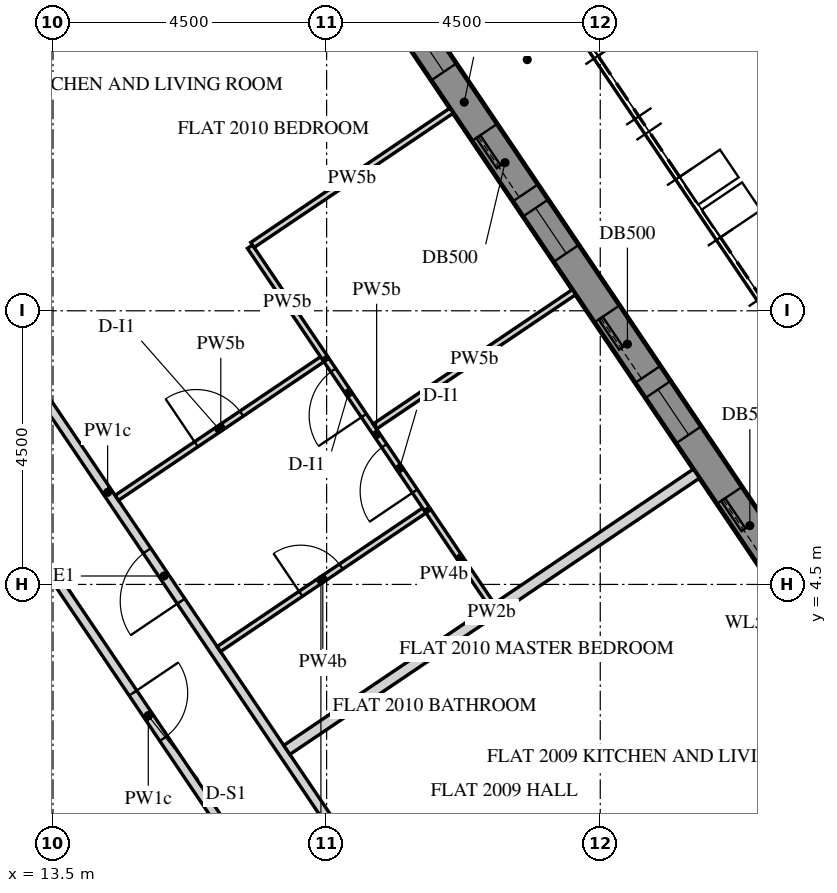
"""IFC4 building model, lengths in metres.
Left out: names, types, materials, properties, quantities, classifications, styles, units other than length and angle.
Written with IfcOpenShell. Run it as: python <this file> out.ifc"""

import sys

from ifc_helpers import new_model, si_unit, direction, frame, frame_2d, origin, place, context, subcontext, project, spatial, polyline, rectangle, outline, extrude, element, fill, save


model = new_model("IFC4")
c1 = context("Model", 3, precision=1e-05, world=origin(), true_north=direction((0.0, 1.0)))
c2 = subcontext(c1, "Body", "Model", "MODEL_VIEW")
j1 = project(units=[si_unit("LENGTHUNIT", "METRE"), si_unit("PLANEANGLEUNIT", "RADIAN")], contexts=[c1])
p1 = place(None, origin())
s1 = spatial("IfcSite", under=j1, at=p1, CompositionType="ELEMENT")
p2 = place(p1, origin())
s2 = spatial("IfcBuilding", under=s1, at=p2, CompositionType="ELEMENT")
p3 = place(p2, frame((0.0, 0.0, 256.2)))
s3 = spatial("IfcBuildingStorey", under=s2, at=p3, CompositionType="ELEMENT", Elevation=256.2)
p4 = place(p3, frame((26.706, 2.879, 0.0), z_axis=(0.0, 0.0, 1.0), x_axis=(-0.559197891507, 0.829034208061, 0.0)))
e1 = element("IfcWall", 1, at=p4, inside=s3, PredefinedType="SOLIDWALL", context=c2, shape_type="SweptSolid", body=[
    extrude(outline(polyline([(0.25, -0.25), (22.795, -0.25), (23.295, 0.25), (-0.25, 0.25), (0.25, -0.25)])), origin(), (0.0, 0.0, 1.0), 3.75),
])
p5 = place(p4, frame((1.323, 0.0, 0.9)))
e2 = element("IfcOpeningElement", 2, at=p5, cuts=e1, PredefinedType="OPENING", context=c2, shape_type="SweptSolid", body=[
    extrude(rectangle(XDim=0.9, YDim=1.5, at=frame_2d((0.45, 0.75))), frame((0.0, 0.26, 0.0), z_axis=(0.0, -1.0, 0.0), x_axis=(1.0, 0.0, 0.0)), (0.0, 0.0, 1.0), 0.52),
])
p6 = place(p4, frame((2.522, 0.0, 0.0)))
e3 = element("IfcOpeningElement", 3, at=p6, cuts=e1, PredefinedType="OPENING", context=c2, shape_type="SweptSolid", body=[
    extrude(rectangle(XDim=1.2, YDim=2.4, at=frame_2d((0.6, 1.2))), frame((0.0, 0.26, 0.0), z_axis=(0.0, -1.0, 0.0), x_axis=(1.0, 0.0, 0.0)), (0.0, 0.0, 1.0), 0.52),
])
p7 = place(p4, frame((4.922, 0.0, 0.9)))
e4 = element("IfcOpeningElement", 4, at=p7, cuts=e1, PredefinedType="OPENING", context=c2, shape_type="SweptSolid", body=[
    extrude(rectangle(XDim=0.9, YDim=1.5, at=frame_2d((0.45, 0.75))), frame((0.0, 0.26, 0.0), z_axis=(0.0, -1.0, 0.0), x_axis=(1.0, 0.0, 0.0)), (0.0, 0.0, 1.0), 0.52),
])
p8 = place(p4, frame((6.122, 0.0, 0.0)))
e5 = element("IfcOpeningElement", 5, at=p8, cuts=e1, PredefinedType="OPENING", context=c2, shape_type="SweptSolid", body=[
    extrude(rectangle(XDim=1.2, YDim=2.4, at=frame_2d((0.6, 1.2))), frame((0.0, 0.26, 0.0), z_axis=(0.0, -1.0, 0.0), x_axis=(1.0, 0.0, 0.0)), (0.0, 0.0, 1.0), 0.52),
])
p9 = place(p4, frame((8.522, 0.0, 0.9)))
e6 = element("IfcOpeningElement", 6, at=p9, cuts=e1, PredefinedType="OPENING", context=c2, shape_type="SweptSolid", body=[
    extrude(rectangle(XDim=0.9, YDim=1.5, at=frame_2d((0.45, 0.75))), frame((0.0, 0.26, 0.0), z_axis=(0.0, -1.0, 0.0), x_axis=(1.0, 0.0, 0.0)), (0.0, 0.0, 1.0), 0.52),
])
p10 = place(p4, frame((9.722, 0.0, 0.0)))
e7 = element("IfcOpeningElement", 7, at=p10, cuts=e1, PredefinedType="OPENING", context=c2, shape_type="SweptSolid", body=[
    extrude(rectangle(XDim=1.2, YDim=2.4, at=frame_2d((0.6, 1.2))), frame((0.0, 0.26, 0.0), z_axis=(0.0, -1.0, 0.0), x_axis=(1.0, 0.0, 0.0)), (0.0, 0.0, 1.0), 0.52),
])
p11 = place(p4, frame((12.122, 0.0, 0.9)))
e8 = element("IfcOpeningElement", 8, at=p11, cuts=e1, PredefinedType="OPENING", context=c2, shape_type="SweptSolid", body=[
    extrude(rectangle(XDim=0.9, YDim=1.5, at=frame_2d((0.45, 0.75))), frame((0.0, 0.26, 0.0), z_axis=(0.0, -1.0, 0.0), x_axis=(1.0, 0.0, 0.0)), (0.0, 0.0, 1.0), 0.52),
])
p12 = place(p4, frame((13.323, 0.0, 0.0)))
e9 = element("IfcOpeningElement", 9, at=p12, cuts=e1, PredefinedType="OPENING", context=c2, shape_type="SweptSolid", body=[
    extrude(rectangle(XDim=1.2, YDim=2.4, at=frame_2d((0.6, 1.2))), frame((0.0, 0.26, 0.0), z_axis=(0.0, -1.0, 0.0), x_axis=(1.0, 0.0, 0.0)), (0.0, 0.0, 1.0), 0.52),
])
p13 = place(p4, frame((15.722, 0.0, 0.9)))
e10 = element("IfcOpeningElement", 10, at=p13, cuts=e1, PredefinedType="OPENING", context=c2, shape_type="SweptSolid", body=[
    extrude(rectangle(XDim=0.9, YDim=1.5, at=frame_2d((0.45, 0.75))), frame((0.0, 0.26, 0.0), z_axis=(0.0, -1.0, 0.0), x_axis=(1.0, 0.0, 0.0)), (0.0, 0.0, 1.0), 0.52),
])
p14 = place(p4, frame((16.922, 0.0, 0.0)))
e11 = element("IfcOpeningElement", 11, at=p14, cuts=e1, PredefinedType="OPENING", context=c2, shape_type="SweptSolid", body=[
    extrude(rectangle(XDim=1.2, YDim=2.4, at=frame_2d((0.6, 1.2))), frame((0.0, 0.26, 0.0), z_axis=(0.0, -1.0, 0.0), x_axis=(1.0, 0.0, 0.0)), (0.0, 0.0, 1.0), 0.52),
])
p15 = place(p4, frame((19.323, 0.0, 0.9)))
e12 = element("IfcOpeningElement", 12, at=p15, cuts=e1, PredefinedType="OPENING", context=c2, shape_type="SweptSolid", body=[
    extrude(rectangle(XDim=0.9, YDim=1.5, at=frame_2d((0.45, 0.75))), frame((0.0, 0.26, 0.0), z_axis=(0.0, -1.0, 0.0), x_axis=(1.0, 0.0, 0.0)), (0.0, 0.0, 1.0), 0.52),
])
p16 = place(p4, frame((20.522, 0.0, 0.0)))
e13 = element("IfcOpeningElement", 13, at=p16, cuts=e1, PredefinedType="OPENING", context=c2, shape_type="SweptSolid", body=[
    extrude(rectangle(XDim=1.2, YDim=2.4, at=frame_2d((0.6, 1.2))), frame((0.0, 0.26, 0.0), z_axis=(0.0, -1.0, 0.0), x_axis=(1.0, 0.0, 0.0)), (0.0, 0.0, 1.0), 0.52),
])
p17 = place(p3, frame((6.351, 11.0, 0.0), z_axis=(0.0, 0.0, 1.0), x_axis=(0.499998894578, 0.866026041999, 0.0)))
e14 = element("IfcWall", 14, at=p17, inside=s3, PredefinedType="SHEAR", context=c2, shape_type="SweptSolid", body=[
    extrude(rectangle(XDim=15.544, YDim=0.4, at=frame_2d((7.772, 0.0))), origin(), (0.0, 0.0, 1.0), 3.75),
])
p18 = place(p17, frame((6.872, 0.0, 0.0)))
e15 = element("IfcOpeningElement", 15, at=p18, cuts=e14, PredefinedType="OPENING", context=c2, shape_type="SweptSolid", body=[
    extrude(rectangle(XDim=1.8, YDim=2.4, at=frame_2d((0.9, 1.2))), frame((0.0, 0.21, 0.0), z_axis=(0.0, -1.0, 0.0), x_axis=(1.0, 0.0, 0.0)), (0.0, 0.0, 1.0), 0.42),
])
p19 = place(p3, frame((19.228, -1.146, 0.0), z_axis=(0.0, 0.0, 1.0), x_axis=(-0.559190017735, 0.829039519001, 0.0)))
e16 = element("IfcWall", 16, at=p19, inside=s3, PredefinedType="PARTITIONING", context=c2, shape_type="SweptSolid", body=[
    extrude(rectangle(XDim=17.273, YDim=0.15, at=frame_2d((8.637, 0.0))), origin(), (0.0, 0.0, 1.0), 2.823),
])
p20 = place(p19, frame((6.478, 0.0, 0.0)))
e17 = element("IfcOpeningElement", 17, at=p20, cuts=e16, PredefinedType="OPENING", context=c2, shape_type="SweptSolid", body=[
    extrude(rectangle(XDim=1.0, YDim=2.1, at=frame_2d((0.5, 1.05))), frame((0.0, 0.085, 0.0), z_axis=(0.0, -1.0, 0.0), x_axis=(1.0, 0.0, 0.0)), (0.0, 0.0, 1.0), 0.17),
])
p21 = place(p3, frame((12.627, 5.958, 0.0), z_axis=(0.0, 0.0, 1.0), x_axis=(0.559185493191, -0.829042570804, 0.0)))
e18 = element("IfcWall", 18, at=p21, inside=s3, PredefinedType="PARTITIONING", context=c2, shape_type="SweptSolid", body=[
    extrude(rectangle(XDim=8.727, YDim=0.15, at=frame_2d((4.363, 0.0))), origin(), (0.0, 0.0, 1.0), 2.823),
])
p22 = place(p21, frame((3.913, 0.0, 0.0)))
e19 = element("IfcOpeningElement", 19, at=p22, cuts=e18, PredefinedType="OPENING", context=c2, shape_type="SweptSolid", body=[
    extrude(rectangle(XDim=0.9, YDim=2.1, at=frame_2d((0.45, 1.05))), frame((0.0, 0.085, 0.0), z_axis=(0.0, -1.0, 0.0), x_axis=(1.0, 0.0, 0.0)), (0.0, 0.0, 1.0), 0.17),
])
p23 = place(p3, frame((24.082, 6.323, 0.0), z_axis=(0.0, 0.0, 1.0), x_axis=(-0.829033253898, -0.55919930609, 0.0)))
e20 = element("IfcWall", 20, at=p23, inside=s3, PredefinedType="PARTITIONING", context=c2, shape_type="SweptSolid", body=[
    extrude(rectangle(XDim=8.125, YDim=0.18, at=frame_2d((4.062, 0.0))), origin(), (0.0, 0.0, 1.0), 2.823),
])
p24 = place(p3, frame((14.55, 5.924, 0.0), z_axis=(0.0, 0.0, 1.0), x_axis=(0.829005765264, 0.559240056827, 0.0)))
e21 = element("IfcWall", 21, at=p24, inside=s3, PredefinedType="PARTITIONING", context=c2, shape_type="SweptSolid", body=[
    extrude(rectangle(XDim=4.125, YDim=0.1, at=frame_2d((2.062, 0.0))), origin(), (0.0, 0.0, 1.0), 2.823),
])
p25 = place(p24, frame((1.575, 0.0, 0.0)))
e22 = element("IfcOpeningElement", 22, at=p25, cuts=e21, PredefinedType="OPENING", context=c2, shape_type="SweptSolid", body=[
    extrude(rectangle(XDim=0.9, YDim=2.1, at=frame_2d((0.45, 1.05))), frame((0.0, 0.06, 0.0), z_axis=(0.0, -1.0, 0.0), x_axis=(1.0, 0.0, 0.0)), (0.0, 0.0, 1.0), 0.12),
])
p26 = place(p3, frame((17.971, 8.229, 0.0), z_axis=(0.0, 0.0, 1.0), x_axis=(-0.559246231198, 0.829001600053, 0.0)))
e23 = element("IfcWall", 23, at=p26, inside=s3, PredefinedType="PARTITIONING", context=c2, shape_type="SweptSolid", body=[
    extrude(rectangle(XDim=2.202, YDim=0.1, at=frame_2d((1.101, 0.0))), origin(), (0.0, 0.0, 1.0), 2.823),
])
p27 = place(p3, frame((16.781, 10.083, 0.0), z_axis=(0.0, 0.0, 1.0), x_axis=(0.829042808667, 0.559185140536, 0.0)))
e24 = element("IfcWall", 24, at=p27, inside=s3, PredefinedType="PARTITIONING", context=c2, shape_type="SweptSolid", body=[
    extrude(rectangle(XDim=3.95, YDim=0.1, at=frame_2d((1.975, 0.0))), origin(), (0.0, 0.0, 1.0), 2.823),
])
p28 = place(p3, frame((16.227, 3.437, 0.0), z_axis=(0.0, 0.0, 1.0), x_axis=(0.829033204172, 0.559199379811, 0.0)))
e25 = element("IfcWall", 25, at=p28, inside=s3, PredefinedType="PARTITIONING", context=c2, shape_type="SweptSolid", body=[
    extrude(rectangle(XDim=4.125, YDim=0.1, at=frame_2d((2.062, 0.0))), origin(), (0.0, 0.0, 1.0), 2.823),
])
p29 = place(p28, frame((1.625, 0.0, 0.0)))
e26 = element("IfcOpeningElement", 26, at=p29, cuts=e25, PredefinedType="OPENING", context=c2, shape_type="SweptSolid", body=[
    extrude(rectangle(XDim=0.8, YDim=2.1, at=frame_2d((0.4, 1.05))), frame((0.0, 0.06, 0.0), z_axis=(0.0, -1.0, 0.0), x_axis=(1.0, 0.0, 0.0)), (0.0, 0.0, 1.0), 0.12),
])
p30 = place(p3, frame((19.648, 5.742, 0.0), z_axis=(0.0, 0.0, 1.0), x_axis=(-0.559193191328, 0.829037378393, 0.0)))
e27 = element("IfcWall", 27, at=p30, inside=s3, PredefinedType="PARTITIONING", context=c2, shape_type="SweptSolid", body=[
    extrude(rectangle(XDim=2.954, YDim=0.1, at=frame_2d((1.477, 0.0))), origin(), (0.0, 0.0, 1.0), 2.823),
])
p31 = place(p30, frame((0.352, 0.0, 0.0)))
e28 = element("IfcOpeningElement", 28, at=p31, cuts=e27, PredefinedType="OPENING", context=c2, shape_type="SweptSolid", body=[
    extrude(rectangle(XDim=0.9, YDim=2.1, at=frame_2d((0.45, 1.05))), frame((0.0, 0.06, 0.0), z_axis=(0.0, -1.0, 0.0), x_axis=(1.0, 0.0, 0.0)), (0.0, 0.0, 1.0), 0.12),
])
p32 = place(p30, frame((1.852, 0.0, 0.0)))
e29 = element("IfcOpeningElement", 29, at=p32, cuts=e27, PredefinedType="OPENING", context=c2, shape_type="SweptSolid", body=[
    extrude(rectangle(XDim=0.9, YDim=2.1, at=frame_2d((0.45, 1.05))), frame((0.0, 0.06, 0.0), z_axis=(0.0, -1.0, 0.0), x_axis=(1.0, 0.0, 0.0)), (0.0, 0.0, 1.0), 0.12),
])
p33 = place(p3, frame((20.715, 4.16, 0.0), z_axis=(0.0, 0.0, 1.0), x_axis=(-0.559200351269, 0.829032548903, 0.0)))
e30 = element("IfcWall", 30, at=p33, inside=s3, PredefinedType="PARTITIONING", context=c2, shape_type="SweptSolid", body=[
    extrude(rectangle(XDim=1.862, YDim=0.1, at=frame_2d((0.931, 0.0))), origin(), (0.0, 0.0, 1.0), 2.823),
])
p34 = place(p3, frame((22.069, 9.307, 0.0), z_axis=(0.0, 0.0, 1.0), x_axis=(-0.829062134085, -0.559156487779, 0.0)))
e31 = element("IfcWall", 31, at=p34, inside=s3, PredefinedType="PARTITIONING", context=c2, shape_type="SweptSolid", body=[
    extrude(rectangle(XDim=3.95, YDim=0.1, at=frame_2d((1.975, 0.0))), origin(), (0.0, 0.0, 1.0), 2.823),
])
p35 = place(p6, frame((0.0, 0.175, 0.0)))
e32 = element("IfcDoor", 32, at=p35, inside=s3, OperationType="SLIDING_TO_LEFT", PredefinedType="DOOR", context=c2, shape_type="SweptSolid", body=[
    extrude(rectangle(XDim=1.2, YDim=2.4, at=frame_2d((0.6, 1.2))), frame((0.0, 0.025, 0.0), z_axis=(0.0, -1.0, 0.0), x_axis=(1.0, 0.0, 0.0)), (0.0, 0.0, 1.0), 0.05),
])
fill(e3, e32)
p36 = place(p7, frame((0.0, 0.18, 0.0)))
e33 = element("IfcWindow", 33, at=p36, inside=s3, PartitioningType="SINGLE_PANEL", PredefinedType="WINDOW", context=c2, shape_type="SweptSolid", body=[
    extrude(rectangle(XDim=0.9, YDim=1.5, at=frame_2d((0.45, 0.75))), frame((0.0, 0.03, 0.0), z_axis=(0.0, -1.0, 0.0), x_axis=(1.0, 0.0, 0.0)), (0.0, 0.0, 1.0), 0.06),
])
fill(e4, e33)
p37 = place(p8, frame((0.0, 0.175, 0.0)))
e34 = element("IfcDoor", 34, at=p37, inside=s3, OperationType="SLIDING_TO_LEFT", PredefinedType="DOOR", context=c2, shape_type="SweptSolid", body=[
    extrude(rectangle(XDim=1.2, YDim=2.4, at=frame_2d((0.6, 1.2))), frame((0.0, 0.025, 0.0), z_axis=(0.0, -1.0, 0.0), x_axis=(1.0, 0.0, 0.0)), (0.0, 0.0, 1.0), 0.05),
])
fill(e5, e34)
p38 = place(p9, frame((0.0, 0.18, 0.0)))
e35 = element("IfcWindow", 35, at=p38, inside=s3, PartitioningType="SINGLE_PANEL", PredefinedType="WINDOW", context=c2, shape_type="SweptSolid", body=[
    extrude(rectangle(XDim=0.9, YDim=1.5, at=frame_2d((0.45, 0.75))), frame((0.0, 0.03, 0.0), z_axis=(0.0, -1.0, 0.0), x_axis=(1.0, 0.0, 0.0)), (0.0, 0.0, 1.0), 0.06),
])
fill(e6, e35)
p39 = place(p10, frame((0.0, 0.175, 0.0)))
e36 = element("IfcDoor", 36, at=p39, inside=s3, OperationType="SLIDING_TO_LEFT", PredefinedType="DOOR", context=c2, shape_type="SweptSolid", body=[
    extrude(rectangle(XDim=1.2, YDim=2.4, at=frame_2d((0.6, 1.2))), frame((0.0, 0.025, 0.0), z_axis=(0.0, -1.0, 0.0), x_axis=(1.0, 0.0, 0.0)), (0.0, 0.0, 1.0), 0.05),
])
fill(e7, e36)
p40 = place(p11, frame((0.0, 0.18, 0.0)))
e37 = element("IfcWindow", 37, at=p40, inside=s3, PartitioningType="SINGLE_PANEL", PredefinedType="WINDOW", context=c2, shape_type="SweptSolid", body=[
    extrude(rectangle(XDim=0.9, YDim=1.5, at=frame_2d((0.45, 0.75))), frame((0.0, 0.03, 0.0), z_axis=(0.0, -1.0, 0.0), x_axis=(1.0, 0.0, 0.0)), (0.0, 0.0, 1.0), 0.06),
])
fill(e8, e37)
p41 = place(p20, origin())
e38 = element("IfcDoor", 38, at=p41, inside=s3, OperationType="SINGLE_SWING_RIGHT", PredefinedType="DOOR", context=c2, shape_type="SweptSolid", body=[
    extrude(rectangle(XDim=1.0, YDim=2.1, at=frame_2d((0.5, 1.05))), frame((0.0, 0.025, 0.0), z_axis=(0.0, -1.0, 0.0), x_axis=(1.0, 0.0, 0.0)), (0.0, 0.0, 1.0), 0.05),
])
fill(e17, e38)
p42 = place(p29, origin())
e39 = element("IfcDoor", 39, at=p42, inside=s3, OperationType="SINGLE_SWING_RIGHT", PredefinedType="DOOR", context=c2, shape_type="SweptSolid", body=[
    extrude(rectangle(XDim=0.8, YDim=2.1, at=frame_2d((0.4, 1.05))), frame((0.0, 0.025, 0.0), z_axis=(0.0, -1.0, 0.0), x_axis=(1.0, 0.0, 0.0)), (0.0, 0.0, 1.0), 0.05),
])
fill(e26, e39)
p43 = place(p25, origin())
e40 = element("IfcDoor", 40, at=p43, inside=s3, OperationType="SINGLE_SWING_RIGHT", PredefinedType="DOOR", context=c2, shape_type="SweptSolid", body=[
    extrude(rectangle(XDim=0.9, YDim=2.1, at=frame_2d((0.45, 1.05))), frame((0.0, 0.025, 0.0), z_axis=(0.0, -1.0, 0.0), x_axis=(1.0, 0.0, 0.0)), (0.0, 0.0, 1.0), 0.05),
])
fill(e22, e40)
p44 = place(p31, origin())
e41 = element("IfcDoor", 41, at=p44, inside=s3, OperationType="SINGLE_SWING_RIGHT", PredefinedType="DOOR", context=c2, shape_type="SweptSolid", body=[
    extrude(rectangle(XDim=0.9, YDim=2.1, at=frame_2d((0.45, 1.05))), frame((0.0, 0.025, 0.0), z_axis=(0.0, -1.0, 0.0), x_axis=(1.0, 0.0, 0.0)), (0.0, 0.0, 1.0), 0.05),
])
fill(e28, e41)
p45 = place(p32, origin())
e42 = element("IfcDoor", 42, at=p45, inside=s3, OperationType="SINGLE_SWING_LEFT", PredefinedType="DOOR", context=c2, shape_type="SweptSolid", body=[
    extrude(rectangle(XDim=0.9, YDim=2.1, at=frame_2d((0.45, 1.05))), frame((0.0, 0.025, 0.0), z_axis=(0.0, -1.0, 0.0), x_axis=(1.0, 0.0, 0.0)), (0.0, 0.0, 1.0), 0.05),
])
fill(e29, e42)
p46 = place(p22, origin())
e43 = element("IfcDoor", 43, at=p46, inside=s3, OperationType="SINGLE_SWING_RIGHT", PredefinedType="DOOR", context=c2, shape_type="SweptSolid", body=[
    extrude(rectangle(XDim=0.9, YDim=2.1, at=frame_2d((0.45, 1.05))), frame((0.0, 0.025, 0.0), z_axis=(0.0, -1.0, 0.0), x_axis=(1.0, 0.0, 0.0)), (0.0, 0.0, 1.0), 0.05),
])
fill(e19, e43)
save(model, sys.argv[1])
